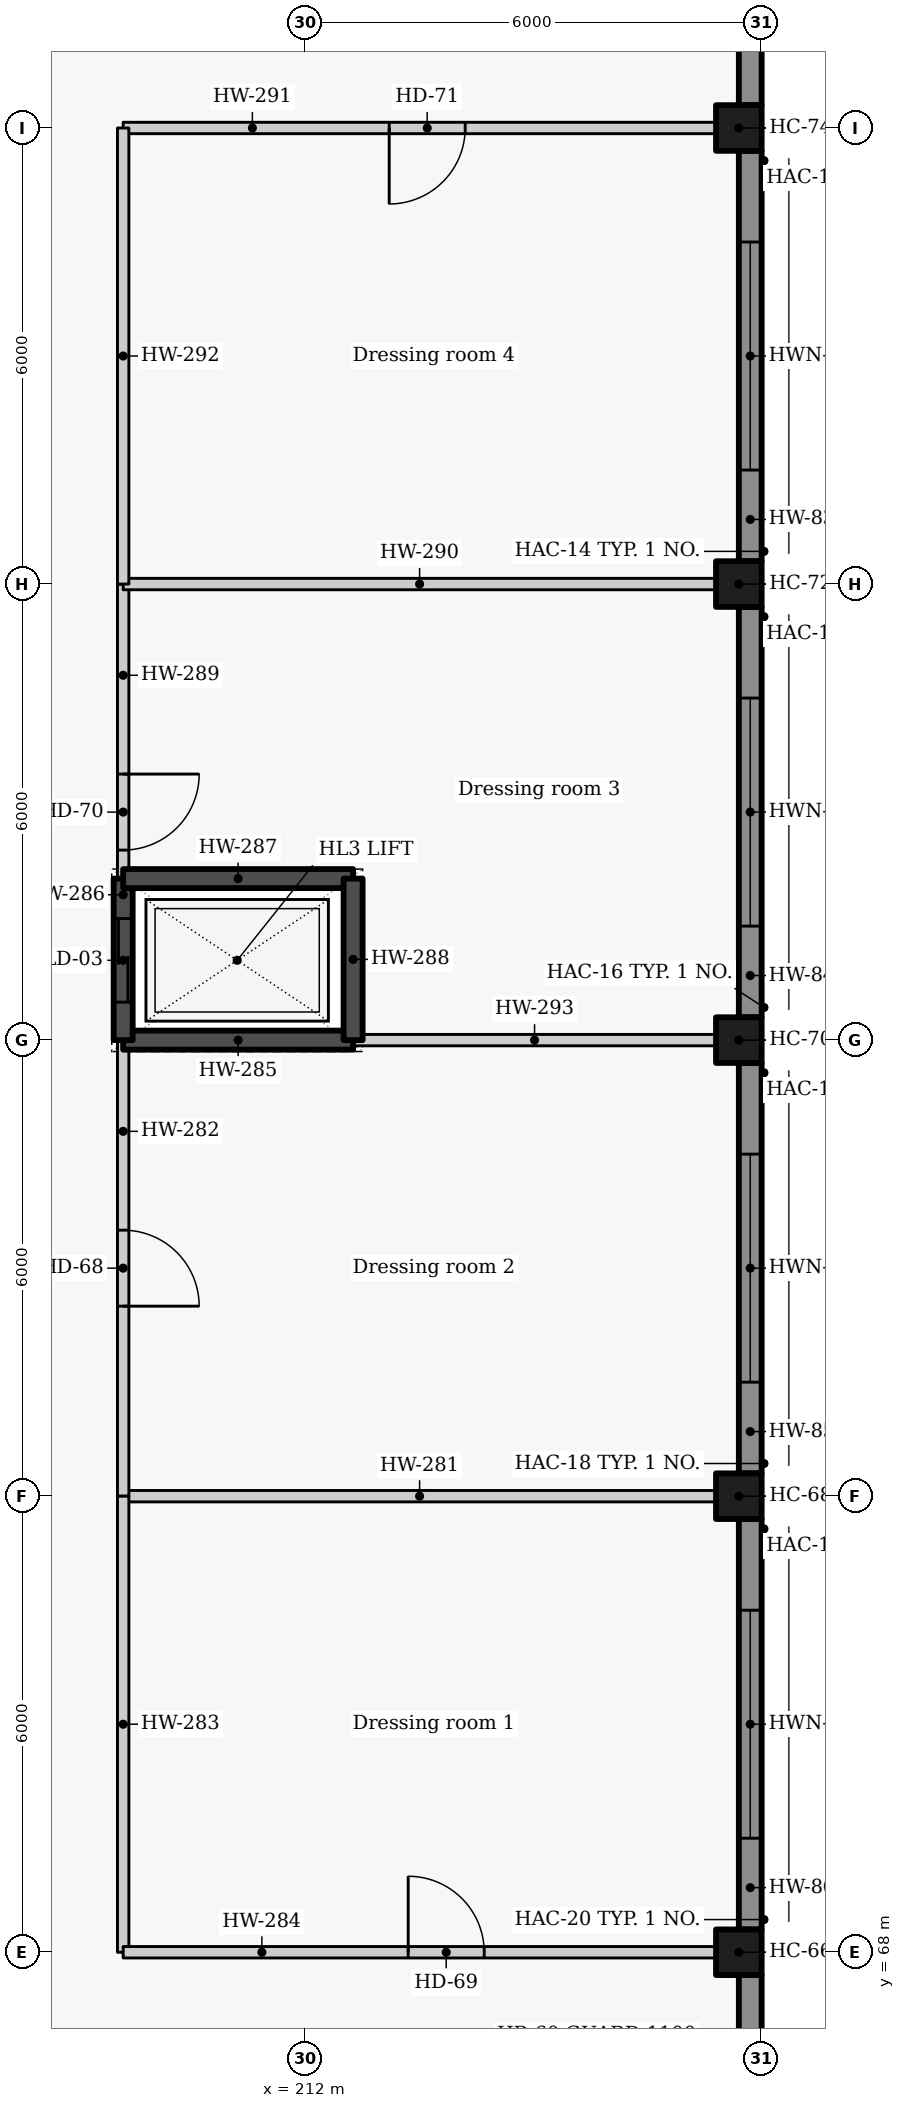
"""IFC4 building model, lengths in metres.
Left out: names, types, materials, properties, quantities, classifications, styles, units other than length and angle.
Written with IfcOpenShell. Run it as: python <this file> out.ifc"""

import sys

from ifc_helpers import new_model, si_unit, direction, frame, frame_2d, origin, origin_2d, place, context, subcontext, project, spatial, rectangle, extrude, element, fill, save


model = new_model("IFC4")
c1 = context("Model", 3, precision=1e-05, world=origin(), true_north=direction((0.0, 1.0)))
c2 = subcontext(c1, "Body", "Model", "MODEL_VIEW")
j1 = project(units=[si_unit("LENGTHUNIT", "METRE"), si_unit("PLANEANGLEUNIT", "RADIAN")], contexts=[c1])
p1 = place(None, origin())
s1 = spatial("IfcSite", under=j1, at=p1, CompositionType="ELEMENT")
p2 = place(p1, origin())
s2 = spatial("IfcBuilding", under=s1, at=p2, CompositionType="ELEMENT")
p3 = place(p2, frame((0.0, 0.0, 6.6)))
s3 = spatial("IfcBuildingStorey", under=s2, at=p3, CompositionType="ELEMENT", Elevation=6.6)
for number, where, z_axis, x_axis in (
    (1, (217.7, 68.0, 0.0), (0.0, 0.0, 1.0), (1.0, 0.0, 0.0)),
    (2, (217.7, 74.0, 0.0), (0.0, 0.0, 1.0), (1.0, 0.0, 0.0)),
    (3, (217.7, 80.0, 0.0), (0.0, 0.0, 1.0), (1.0, 0.0, 0.0)),
    (4, (217.7, 86.0, 0.0), (0.0, 0.0, 1.0), (1.0, 0.0, 0.0)),
    (5, (217.7, 92.0, 0.0), (0.0, 0.0, 1.0), (1.0, 0.0, 0.0)),
):
    element("IfcColumn", number, at=place(p3, frame(where, z_axis=z_axis, x_axis=x_axis)), inside=s3, PredefinedType="COLUMN", context=c2, shape_type="SweptSolid", body=[
        extrude(rectangle(XDim=0.6, YDim=0.6, at=origin_2d()), origin(), (0.0, 0.0, 1.0), 4.8),
    ])
p4 = place(p3, frame((217.85, 101.0, 0.0), z_axis=(0.0, 0.0, 1.0), x_axis=(0.0, -1.0, 0.0)))
e6 = element("IfcWall", 6, at=p4, inside=s3, PredefinedType="SOLIDWALL", context=c2, shape_type="SweptSolid", body=[
    extrude(rectangle(XDim=8.7, YDim=0.3, at=frame_2d((4.35, 0.0))), origin(), (0.0, 0.0, 1.0), 4.8),
])
p5 = place(p3, frame((217.85, 91.7, 0.0), z_axis=(0.0, 0.0, 1.0), x_axis=(0.0, -1.0, 0.0)))
e7 = element("IfcWall", 7, at=p5, inside=s3, PredefinedType="SOLIDWALL", context=c2, shape_type="SweptSolid", body=[
    extrude(rectangle(XDim=5.4, YDim=0.3, at=frame_2d((2.7, 0.0))), origin(), (0.0, 0.0, 1.0), 4.8),
])
p6 = place(p5, frame((1.2, 0.0, 0.9)))
e8 = element("IfcOpeningElement", 8, at=p6, cuts=e7, PredefinedType="OPENING", context=c2, shape_type="SweptSolid", body=[
    extrude(rectangle(XDim=3.0, YDim=1.8, at=frame_2d((1.5, 0.9))), frame((0.0, 0.16, 0.0), z_axis=(0.0, -1.0, 0.0), x_axis=(1.0, 0.0, 0.0)), (0.0, 0.0, 1.0), 0.32),
])
p7 = place(p3, frame((217.85, 85.7, 0.0), z_axis=(0.0, 0.0, 1.0), x_axis=(0.0, -1.0, 0.0)))
e9 = element("IfcWall", 9, at=p7, inside=s3, PredefinedType="SOLIDWALL", context=c2, shape_type="SweptSolid", body=[
    extrude(rectangle(XDim=5.4, YDim=0.3, at=frame_2d((2.7, 0.0))), origin(), (0.0, 0.0, 1.0), 4.8),
])
p8 = place(p7, frame((1.2, 0.0, 0.9)))
e10 = element("IfcOpeningElement", 10, at=p8, cuts=e9, PredefinedType="OPENING", context=c2, shape_type="SweptSolid", body=[
    extrude(rectangle(XDim=3.0, YDim=1.8, at=frame_2d((1.5, 0.9))), frame((0.0, 0.16, 0.0), z_axis=(0.0, -1.0, 0.0), x_axis=(1.0, 0.0, 0.0)), (0.0, 0.0, 1.0), 0.32),
])
p9 = place(p3, frame((217.85, 79.7, 0.0), z_axis=(0.0, 0.0, 1.0), x_axis=(0.0, -1.0, 0.0)))
e11 = element("IfcWall", 11, at=p9, inside=s3, PredefinedType="SOLIDWALL", context=c2, shape_type="SweptSolid", body=[
    extrude(rectangle(XDim=5.4, YDim=0.3, at=frame_2d((2.7, 0.0))), origin(), (0.0, 0.0, 1.0), 4.8),
])
p10 = place(p9, frame((1.2, 0.0, 0.9)))
e12 = element("IfcOpeningElement", 12, at=p10, cuts=e11, PredefinedType="OPENING", context=c2, shape_type="SweptSolid", body=[
    extrude(rectangle(XDim=3.0, YDim=1.8, at=frame_2d((1.5, 0.9))), frame((0.0, 0.16, 0.0), z_axis=(0.0, -1.0, 0.0), x_axis=(1.0, 0.0, 0.0)), (0.0, 0.0, 1.0), 0.32),
])
p11 = place(p3, frame((217.85, 73.7, 0.0), z_axis=(0.0, 0.0, 1.0), x_axis=(0.0, -1.0, 0.0)))
e13 = element("IfcWall", 13, at=p11, inside=s3, PredefinedType="SOLIDWALL", context=c2, shape_type="SweptSolid", body=[
    extrude(rectangle(XDim=5.4, YDim=0.3, at=frame_2d((2.7, 0.0))), origin(), (0.0, 0.0, 1.0), 4.8),
])
p12 = place(p11, frame((1.2, 0.0, 0.9)))
e14 = element("IfcOpeningElement", 14, at=p12, cuts=e13, PredefinedType="OPENING", context=c2, shape_type="SweptSolid", body=[
    extrude(rectangle(XDim=3.0, YDim=1.8, at=frame_2d((1.5, 0.9))), frame((0.0, 0.16, 0.0), z_axis=(0.0, -1.0, 0.0), x_axis=(1.0, 0.0, 0.0)), (0.0, 0.0, 1.0), 0.32),
])
p13 = place(p3, frame((217.85, 67.7, 0.0), z_axis=(0.0, 0.0, 1.0), x_axis=(0.0, -1.0, 0.0)))
e15 = element("IfcWall", 15, at=p13, inside=s3, PredefinedType="SOLIDWALL", context=c2, shape_type="SweptSolid", body=[
    extrude(rectangle(XDim=8.7, YDim=0.3, at=frame_2d((4.35, 0.0))), origin(), (0.0, 0.0, 1.0), 4.8),
])
p14 = place(p3, frame((209.6, 74.0, 0.0), z_axis=(0.0, 0.0, 1.0), x_axis=(1.0, 0.0, 0.0)))
e16 = element("IfcWall", 16, at=p14, inside=s3, PredefinedType="PARTITIONING", context=c2, shape_type="SweptSolid", body=[
    extrude(rectangle(XDim=7.8, YDim=0.15, at=frame_2d((3.9, 0.0))), origin(), (0.0, 0.0, 1.0), 4.45),
])
p15 = place(p3, frame((209.6, 80.0, 0.0), z_axis=(0.0, 0.0, 1.0), x_axis=(0.0, -1.0, 0.0)))
e17 = element("IfcWall", 17, at=p15, inside=s3, PredefinedType="PARTITIONING", context=c2, shape_type="SweptSolid", body=[
    extrude(rectangle(XDim=6.0, YDim=0.15, at=frame_2d((3.0, 0.0))), origin(), (0.0, 0.0, 1.0), 4.45),
])
p16 = place(p15, frame((2.5, 0.0, 0.0)))
e18 = element("IfcOpeningElement", 18, at=p16, cuts=e17, PredefinedType="OPENING", context=c2, shape_type="SweptSolid", body=[
    extrude(rectangle(XDim=1.0, YDim=2.1, at=frame_2d((0.5, 1.05))), frame((0.0, 0.085, 0.0), z_axis=(0.0, -1.0, 0.0), x_axis=(1.0, 0.0, 0.0)), (0.0, 0.0, 1.0), 0.17),
])
p17 = place(p3, frame((209.6, 74.0, 0.0), z_axis=(0.0, 0.0, 1.0), x_axis=(0.0, -1.0, 0.0)))
e19 = element("IfcWall", 19, at=p17, inside=s3, PredefinedType="PARTITIONING", context=c2, shape_type="SweptSolid", body=[
    extrude(rectangle(XDim=6.0, YDim=0.15, at=frame_2d((3.0, 0.0))), origin(), (0.0, 0.0, 1.0), 4.45),
])
p18 = place(p3, frame((209.6, 68.0, 0.0), z_axis=(0.0, 0.0, 1.0), x_axis=(1.0, 0.0, 0.0)))
e20 = element("IfcWall", 20, at=p18, inside=s3, PredefinedType="PARTITIONING", context=c2, shape_type="SweptSolid", body=[
    extrude(rectangle(XDim=7.8, YDim=0.15, at=frame_2d((3.9, 0.0))), origin(), (0.0, 0.0, 1.0), 4.45),
])
p19 = place(p18, frame((3.75, 0.0, 0.0)))
e21 = element("IfcOpeningElement", 21, at=p19, cuts=e20, PredefinedType="OPENING", context=c2, shape_type="SweptSolid", body=[
    extrude(rectangle(XDim=1.0, YDim=2.1, at=frame_2d((0.5, 1.05))), frame((0.0, 0.085, 0.0), z_axis=(0.0, -1.0, 0.0), x_axis=(1.0, 0.0, 0.0)), (0.0, 0.0, 1.0), 0.17),
])
p20 = place(p3, frame((209.6, 80.0, 0.0), z_axis=(0.0, 0.0, 1.0), x_axis=(1.0, 0.0, 0.0)))
e22 = element("IfcWall", 22, at=p20, inside=s3, PredefinedType="SOLIDWALL", context=c2, shape_type="SweptSolid", body=[
    extrude(rectangle(XDim=3.025, YDim=0.25, at=frame_2d((1.512, 0.0))), origin(), (0.0, 0.0, 1.0), 4.8),
])
p21 = place(p3, frame((209.6, 82.125, 0.0), z_axis=(0.0, 0.0, 1.0), x_axis=(0.0, -1.0, 0.0)))
e23 = element("IfcWall", 23, at=p21, inside=s3, PredefinedType="SOLIDWALL", context=c2, shape_type="SweptSolid", body=[
    extrude(rectangle(XDim=2.125, YDim=0.25, at=frame_2d((1.062, 0.0))), origin(), (0.0, 0.0, 1.0), 4.8),
])
p22 = place(p21, frame((0.525, 0.0, 0.0)))
e24 = element("IfcOpeningElement", 24, at=p22, cuts=e23, PredefinedType="OPENING", context=c2, shape_type="SweptSolid", body=[
    extrude(rectangle(XDim=1.1, YDim=2.1, at=frame_2d((0.55, 1.05))), frame((0.0, 0.135, 0.0), z_axis=(0.0, -1.0, 0.0), x_axis=(1.0, 0.0, 0.0)), (0.0, 0.0, 1.0), 0.27),
])
p23 = place(p3, frame((209.6, 82.125, 0.0), z_axis=(0.0, 0.0, 1.0), x_axis=(1.0, 0.0, 0.0)))
e25 = element("IfcWall", 25, at=p23, inside=s3, PredefinedType="SOLIDWALL", context=c2, shape_type="SweptSolid", body=[
    extrude(rectangle(XDim=3.025, YDim=0.25, at=frame_2d((1.512, 0.0))), origin(), (0.0, 0.0, 1.0), 4.8),
])
p24 = place(p3, frame((212.625, 82.125, 0.0), z_axis=(0.0, 0.0, 1.0), x_axis=(0.0, -1.0, 0.0)))
e26 = element("IfcWall", 26, at=p24, inside=s3, PredefinedType="SOLIDWALL", context=c2, shape_type="SweptSolid", body=[
    extrude(rectangle(XDim=2.125, YDim=0.25, at=frame_2d((1.062, 0.0))), origin(), (0.0, 0.0, 1.0), 4.8),
])
p25 = place(p3, frame((209.6, 86.0, 0.0), z_axis=(0.0, 0.0, 1.0), x_axis=(0.0, -1.0, 0.0)))
e27 = element("IfcWall", 27, at=p25, inside=s3, PredefinedType="PARTITIONING", context=c2, shape_type="SweptSolid", body=[
    extrude(rectangle(XDim=3.875, YDim=0.15, at=frame_2d((1.938, 0.0))), origin(), (0.0, 0.0, 1.0), 4.45),
])
p26 = place(p25, frame((2.5, 0.0, 0.0)))
e28 = element("IfcOpeningElement", 28, at=p26, cuts=e27, PredefinedType="OPENING", context=c2, shape_type="SweptSolid", body=[
    extrude(rectangle(XDim=1.0, YDim=2.1, at=frame_2d((0.5, 1.05))), frame((0.0, 0.085, 0.0), z_axis=(0.0, -1.0, 0.0), x_axis=(1.0, 0.0, 0.0)), (0.0, 0.0, 1.0), 0.17),
])
p27 = place(p3, frame((209.6, 86.0, 0.0), z_axis=(0.0, 0.0, 1.0), x_axis=(1.0, 0.0, 0.0)))
e29 = element("IfcWall", 29, at=p27, inside=s3, PredefinedType="PARTITIONING", context=c2, shape_type="SweptSolid", body=[
    extrude(rectangle(XDim=7.8, YDim=0.15, at=frame_2d((3.9, 0.0))), origin(), (0.0, 0.0, 1.0), 4.45),
])
p28 = place(p3, frame((217.4, 92.0, 0.0), z_axis=(0.0, 0.0, 1.0), x_axis=(-1.0, 0.0, 0.0)))
e30 = element("IfcWall", 30, at=p28, inside=s3, PredefinedType="PARTITIONING", context=c2, shape_type="SweptSolid", body=[
    extrude(rectangle(XDim=7.8, YDim=0.15, at=frame_2d((3.9, 0.0))), origin(), (0.0, 0.0, 1.0), 4.45),
])
p29 = place(p28, frame((3.3, 0.0, 0.0)))
e31 = element("IfcOpeningElement", 31, at=p29, cuts=e30, PredefinedType="OPENING", context=c2, shape_type="SweptSolid", body=[
    extrude(rectangle(XDim=1.0, YDim=2.1, at=frame_2d((0.5, 1.05))), frame((0.0, 0.085, 0.0), z_axis=(0.0, -1.0, 0.0), x_axis=(1.0, 0.0, 0.0)), (0.0, 0.0, 1.0), 0.17),
])
p30 = place(p3, frame((209.6, 92.0, 0.0), z_axis=(0.0, 0.0, 1.0), x_axis=(0.0, -1.0, 0.0)))
e32 = element("IfcWall", 32, at=p30, inside=s3, PredefinedType="PARTITIONING", context=c2, shape_type="SweptSolid", body=[
    extrude(rectangle(XDim=6.0, YDim=0.15, at=frame_2d((3.0, 0.0))), origin(), (0.0, 0.0, 1.0), 4.45),
])
p31 = place(p3, frame((212.625, 80.0, 0.0), z_axis=(0.0, 0.0, 1.0), x_axis=(1.0, 0.0, 0.0)))
e33 = element("IfcWall", 33, at=p31, inside=s3, PredefinedType="PARTITIONING", context=c2, shape_type="SweptSolid", body=[
    extrude(rectangle(XDim=4.775, YDim=0.15, at=frame_2d((2.387, 0.0))), origin(), (0.0, 0.0, 1.0), 4.45),
])
p32 = place(p6, origin())
e34 = element("IfcWindow", 34, at=p32, inside=s3, PartitioningType="SINGLE_PANEL", PredefinedType="WINDOW", context=c2, shape_type="SweptSolid", body=[
    extrude(rectangle(XDim=3.0, YDim=1.8, at=frame_2d((1.5, 0.9))), frame((0.0, 0.03, 0.0), z_axis=(0.0, -1.0, 0.0), x_axis=(1.0, 0.0, 0.0)), (0.0, 0.0, 1.0), 0.06),
])
fill(e8, e34)
p33 = place(p8, origin())
e35 = element("IfcWindow", 35, at=p33, inside=s3, PartitioningType="SINGLE_PANEL", PredefinedType="WINDOW", context=c2, shape_type="SweptSolid", body=[
    extrude(rectangle(XDim=3.0, YDim=1.8, at=frame_2d((1.5, 0.9))), frame((0.0, 0.03, 0.0), z_axis=(0.0, -1.0, 0.0), x_axis=(1.0, 0.0, 0.0)), (0.0, 0.0, 1.0), 0.06),
])
fill(e10, e35)
p34 = place(p10, origin())
e36 = element("IfcWindow", 36, at=p34, inside=s3, PartitioningType="SINGLE_PANEL", PredefinedType="WINDOW", context=c2, shape_type="SweptSolid", body=[
    extrude(rectangle(XDim=3.0, YDim=1.8, at=frame_2d((1.5, 0.9))), frame((0.0, 0.03, 0.0), z_axis=(0.0, -1.0, 0.0), x_axis=(1.0, 0.0, 0.0)), (0.0, 0.0, 1.0), 0.06),
])
fill(e12, e36)
p35 = place(p12, origin())
e37 = element("IfcWindow", 37, at=p35, inside=s3, PartitioningType="SINGLE_PANEL", PredefinedType="WINDOW", context=c2, shape_type="SweptSolid", body=[
    extrude(rectangle(XDim=3.0, YDim=1.8, at=frame_2d((1.5, 0.9))), frame((0.0, 0.03, 0.0), z_axis=(0.0, -1.0, 0.0), x_axis=(1.0, 0.0, 0.0)), (0.0, 0.0, 1.0), 0.06),
])
fill(e14, e37)
p36 = place(p16, origin())
e38 = element("IfcDoor", 38, at=p36, inside=s3, OperationType="SINGLE_SWING_RIGHT", PredefinedType="DOOR", context=c2, shape_type="SweptSolid", body=[
    extrude(rectangle(XDim=1.0, YDim=2.1, at=frame_2d((0.5, 1.05))), frame((0.0, 0.025, 0.0), z_axis=(0.0, -1.0, 0.0), x_axis=(1.0, 0.0, 0.0)), (0.0, 0.0, 1.0), 0.05),
])
fill(e18, e38)
p37 = place(p19, origin())
e39 = element("IfcDoor", 39, at=p37, inside=s3, OperationType="SINGLE_SWING_LEFT", PredefinedType="DOOR", context=c2, shape_type="SweptSolid", body=[
    extrude(rectangle(XDim=1.0, YDim=2.1, at=frame_2d((0.5, 1.05))), frame((0.0, 0.025, 0.0), z_axis=(0.0, -1.0, 0.0), x_axis=(1.0, 0.0, 0.0)), (0.0, 0.0, 1.0), 0.05),
])
fill(e21, e39)
p38 = place(p22, origin())
e40 = element("IfcDoor", 40, at=p38, inside=s3, OperationType="SLIDING_TO_LEFT", PredefinedType="DOOR", context=c2, shape_type="SweptSolid", body=[
    extrude(rectangle(XDim=1.1, YDim=2.1, at=frame_2d((0.55, 1.05))), frame((0.0, 0.025, 0.0), z_axis=(0.0, -1.0, 0.0), x_axis=(1.0, 0.0, 0.0)), (0.0, 0.0, 1.0), 0.05),
])
fill(e24, e40)
p39 = place(p26, origin())
e41 = element("IfcDoor", 41, at=p39, inside=s3, OperationType="SINGLE_SWING_LEFT", PredefinedType="DOOR", context=c2, shape_type="SweptSolid", body=[
    extrude(rectangle(XDim=1.0, YDim=2.1, at=frame_2d((0.5, 1.05))), frame((0.0, 0.025, 0.0), z_axis=(0.0, -1.0, 0.0), x_axis=(1.0, 0.0, 0.0)), (0.0, 0.0, 1.0), 0.05),
])
fill(e28, e41)
p40 = place(p29, origin())
e42 = element("IfcDoor", 42, at=p40, inside=s3, OperationType="SINGLE_SWING_RIGHT", PredefinedType="DOOR", context=c2, shape_type="SweptSolid", body=[
    extrude(rectangle(XDim=1.0, YDim=2.1, at=frame_2d((0.5, 1.05))), frame((0.0, 0.025, 0.0), z_axis=(0.0, -1.0, 0.0), x_axis=(1.0, 0.0, 0.0)), (0.0, 0.0, 1.0), 0.05),
])
fill(e31, e42)
save(model, sys.argv[1])
